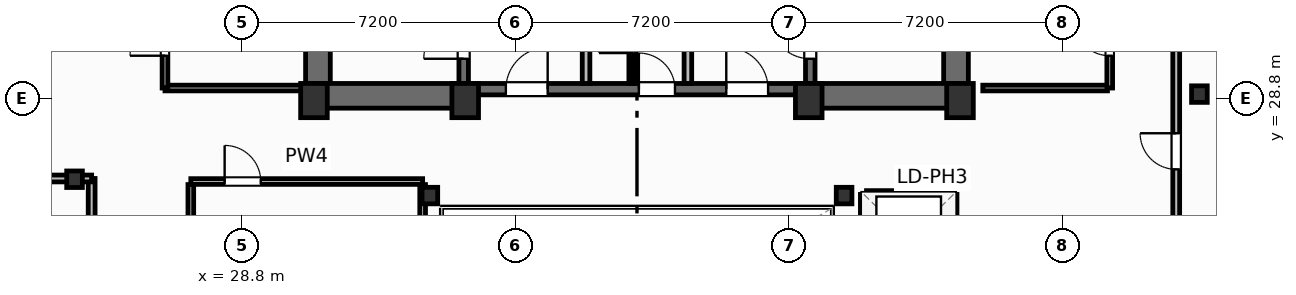
"""IFC4 building model, lengths in metres.
Left out: names, types, materials, properties, quantities, classifications, styles, units other than length and angle.
Written with IfcOpenShell. Run it as: python <this file> out.ifc"""

import sys

from ifc_helpers import new_model, si_unit, direction, frame, frame_2d, origin, origin_2d, place, context, subcontext, project, spatial, rectangle, i_section, extrude, element, fill, save


model = new_model("IFC4")
c1 = context("Model", 3, precision=1e-05, world=origin(), true_north=direction((0.0, 1.0)))
c2 = subcontext(c1, "Body", "Model", "MODEL_VIEW")
j1 = project(units=[si_unit("LENGTHUNIT", "METRE"), si_unit("PLANEANGLEUNIT", "RADIAN")], contexts=[c1])
p1 = place(None, origin())
s1 = spatial("IfcSite", under=j1, at=p1, CompositionType="ELEMENT")
p2 = place(p1, origin())
s2 = spatial("IfcBuilding", under=s1, at=p2, CompositionType="ELEMENT")
p3 = place(p2, frame((0.0, 0.0, 220.1)))
s3 = spatial("IfcBuildingStorey", under=s2, at=p3, CompositionType="ELEMENT", Elevation=220.1)
for number, where, z_axis, x_axis in (
    (1, (30.7, 28.75, 0.0), (0.0, 0.0, 1.0), (1.0, 0.0, 0.0)),
    (2, (34.68, 28.75, 0.0), (0.0, 0.0, 1.0), (1.0, 0.0, 0.0)),
    (3, (43.72, 28.75, 0.0), (0.0, 0.0, 1.0), (1.0, 0.0, 0.0)),
    (4, (47.7, 28.75, 0.0), (0.0, 0.0, 1.0), (1.0, 0.0, 0.0)),
):
    element("IfcColumn", number, at=place(p3, frame(where, z_axis=z_axis, x_axis=x_axis)), inside=s3, PredefinedType="COLUMN", context=c2, shape_type="SweptSolid", body=[
        extrude(rectangle(XDim=0.7, YDim=0.9, at=origin_2d()), origin(), (0.0, 0.0, 1.0), 3.7),
    ])
for number, where, z_axis, x_axis in (
    (5, (33.75, 26.25, 0.0), (0.0, 0.0, 1.0), (1.0, 0.0, 0.0)),
    (6, (44.65, 26.25, 0.0), (0.0, 0.0, 1.0), (1.0, 0.0, 0.0)),
    (7, (24.4, 26.68, 0.0), (0.0, 0.0, 1.0), (1.0, 0.0, 0.0)),
    (8, (54.0, 28.92, 0.0), (0.0, 0.0, 1.0), (1.0, 0.0, 0.0)),
):
    element("IfcColumn", number, at=place(p3, frame(where, z_axis=z_axis, x_axis=x_axis)), inside=s3, PredefinedType="COLUMN", context=c2, shape_type="SweptSolid", body=[
        extrude(i_section(OverallWidth=0.412, OverallDepth=0.435, WebThickness=0.036, FlangeThickness=0.057, FilletRadius=0.025, at=origin_2d()), origin(), (0.0, 0.0, 1.0), 3.7),
    ])
for number, where, z_axis, x_axis in (
    (9, (30.805, 29.2, 0.0), (0.0, 0.0, 1.0), (0.0, 1.0, 0.0)),
    (10, (47.595, 29.2, 0.0), (0.0, 0.0, 1.0), (0.0, 1.0, 0.0)),
):
    element("IfcWall", number, at=place(p3, frame(where, z_axis=z_axis, x_axis=x_axis)), inside=s3, PredefinedType="SHEAR", context=c2, shape_type="SweptSolid", body=[
        extrude(rectangle(XDim=9.22, YDim=0.65, at=frame_2d((4.61, 0.0))), origin(), (0.0, 0.0, 1.0), 3.45),
    ])
p4 = place(p3, frame((30.48, 28.875, 0.0), z_axis=(0.0, 0.0, 1.0), x_axis=(1.0, 0.0, 0.0)))
e11 = element("IfcWall", 11, at=p4, inside=s3, PredefinedType="SHEAR", context=c2, shape_type="SweptSolid", body=[
    extrude(rectangle(XDim=4.32, YDim=0.65, at=frame_2d((2.16, 0.0))), origin(), (0.0, 0.0, 1.0), 3.45),
])
p5 = place(p3, frame((43.6, 28.875, 0.0), z_axis=(0.0, 0.0, 1.0), x_axis=(1.0, 0.0, 0.0)))
e12 = element("IfcWall", 12, at=p5, inside=s3, PredefinedType="SHEAR", context=c2, shape_type="SweptSolid", body=[
    extrude(rectangle(XDim=4.32, YDim=0.65, at=frame_2d((2.16, 0.0))), origin(), (0.0, 0.0, 1.0), 3.45),
])
p6 = place(p3, frame((34.8, 29.05, 0.0), z_axis=(0.0, 0.0, 1.0), x_axis=(1.0, 0.0, 0.0)))
e13 = element("IfcWall", 13, at=p6, inside=s3, PredefinedType="SHEAR", context=c2, shape_type="SweptSolid", body=[
    extrude(rectangle(XDim=8.8, YDim=0.3, at=frame_2d((4.4, 0.0))), origin(), (0.0, 0.0, 1.0), 3.45),
])
p7 = place(p6, frame((0.95, 0.0, 0.0)))
e14 = element("IfcOpeningElement", 14, at=p7, cuts=e13, PredefinedType="OPENING", context=c2, shape_type="SweptSolid", body=[
    extrude(rectangle(XDim=1.1, YDim=2.15, at=frame_2d((0.55, 1.075))), frame((0.0, 0.16, 0.0), z_axis=(0.0, -1.0, 0.0), x_axis=(1.0, 0.0, 0.0)), (0.0, 0.0, 1.0), 0.32),
])
p8 = place(p6, frame((6.75, 0.0, 0.0)))
e15 = element("IfcOpeningElement", 15, at=p8, cuts=e13, PredefinedType="OPENING", context=c2, shape_type="SweptSolid", body=[
    extrude(rectangle(XDim=1.1, YDim=2.15, at=frame_2d((0.55, 1.075))), frame((0.0, 0.16, 0.0), z_axis=(0.0, -1.0, 0.0), x_axis=(1.0, 0.0, 0.0)), (0.0, 0.0, 1.0), 0.32),
])
p9 = place(p6, frame((4.45, 0.0, 0.0)))
e16 = element("IfcOpeningElement", 16, at=p9, cuts=e13, PredefinedType="OPENING", context=c2, shape_type="SweptSolid", body=[
    extrude(rectangle(XDim=0.95, YDim=2.15, at=frame_2d((0.475, 1.075))), frame((0.0, 0.16, 0.0), z_axis=(0.0, -1.0, 0.0), x_axis=(1.0, 0.0, 0.0)), (0.0, 0.0, 1.0), 0.32),
])
p10 = place(p3, frame((34.64, 29.2, 0.0), z_axis=(0.0, 0.0, 1.0), x_axis=(0.0, 1.0, 0.0)))
e17 = element("IfcWall", 17, at=p10, inside=s3, PredefinedType="SHEAR", context=c2, shape_type="SweptSolid", body=[
    extrude(rectangle(XDim=9.22, YDim=0.25, at=frame_2d((4.61, 0.0))), origin(), (0.0, 0.0, 1.0), 3.45),
])
p11 = place(p10, frame((0.65, 0.0, 0.0)))
e18 = element("IfcOpeningElement", 18, at=p11, cuts=e17, PredefinedType="OPENING", context=c2, shape_type="SweptSolid", body=[
    extrude(rectangle(XDim=1.05, YDim=2.15, at=frame_2d((0.525, 1.075))), frame((0.0, 0.135, 0.0), z_axis=(0.0, -1.0, 0.0), x_axis=(1.0, 0.0, 0.0)), (0.0, 0.0, 1.0), 0.27),
])
p12 = place(p3, frame((43.76, 29.2, 0.0), z_axis=(0.0, 0.0, 1.0), x_axis=(0.0, 1.0, 0.0)))
e19 = element("IfcWall", 19, at=p12, inside=s3, PredefinedType="SHEAR", context=c2, shape_type="SweptSolid", body=[
    extrude(rectangle(XDim=9.22, YDim=0.25, at=frame_2d((4.61, 0.0))), origin(), (0.0, 0.0, 1.0), 3.45),
])
p13 = place(p12, frame((0.65, 0.0, 0.0)))
e20 = element("IfcOpeningElement", 20, at=p13, cuts=e19, PredefinedType="OPENING", context=c2, shape_type="SweptSolid", body=[
    extrude(rectangle(XDim=1.05, YDim=2.15, at=frame_2d((0.525, 1.075))), frame((0.0, 0.135, 0.0), z_axis=(0.0, -1.0, 0.0), x_axis=(1.0, 0.0, 0.0)), (0.0, 0.0, 1.0), 0.27),
])
p14 = place(p3, frame((24.85, 19.2, 0.0), z_axis=(0.0, 0.0, 1.0), x_axis=(0.0, 1.0, 0.0)))
e21 = element("IfcWall", 21, at=p14, inside=s3, PredefinedType="PARTITIONING", context=c2, shape_type="SweptSolid", body=[
    extrude(rectangle(XDim=7.5, YDim=0.18, at=frame_2d((3.75, 0.0))), origin(), (0.0, 0.0, 1.0), 3.45),
])
p15 = place(p14, frame((3.275, 0.0, 0.0)))
e22 = element("IfcOpeningElement", 22, at=p15, cuts=e21, PredefinedType="OPENING", context=c2, shape_type="SweptSolid", body=[
    extrude(rectangle(XDim=0.95, YDim=2.05, at=frame_2d((0.475, 1.025))), frame((0.0, 0.1, 0.0), z_axis=(0.0, -1.0, 0.0), x_axis=(1.0, 0.0, 0.0)), (0.0, 0.0, 1.0), 0.2),
])
p16 = place(p3, frame((3.467, 26.7, 0.0), z_axis=(0.0, 0.0, 1.0), x_axis=(1.0, 0.0, 0.0)))
e23 = element("IfcWall", 23, at=p16, inside=s3, PredefinedType="PARTITIONING", context=c2, shape_type="SweptSolid", body=[
    extrude(rectangle(XDim=21.383, YDim=0.18, at=frame_2d((10.691, 0.0))), origin(), (0.0, 0.0, 1.0), 2.662),
])
p17 = place(p3, frame((53.39, 19.24, 0.0), z_axis=(0.0, 0.0, 1.0), x_axis=(0.0, 1.0, 0.0)))
e24 = element("IfcWall", 24, at=p17, inside=s3, PredefinedType="PARTITIONING", context=c2, shape_type="SweptSolid", body=[
    extrude(rectangle(XDim=20.06, YDim=0.18, at=frame_2d((10.03, 0.0))), origin(), (0.0, 0.0, 1.0), 3.45),
])
p18 = place(p17, frame((7.7, 0.0, 0.0)))
e25 = element("IfcOpeningElement", 25, at=p18, cuts=e24, PredefinedType="OPENING", context=c2, shape_type="SweptSolid", body=[
    extrude(rectangle(XDim=0.95, YDim=2.05, at=frame_2d((0.475, 1.025))), frame((0.0, 0.1, 0.0), z_axis=(0.0, -1.0, 0.0), x_axis=(1.0, 0.0, 0.0)), (0.0, 0.0, 1.0), 0.2),
])
for number, where, z_axis, x_axis in (
    (26, (37.86, 29.2, 0.0), (0.0, 0.0, 1.0), (0.0, 1.0, 0.0)),
    (27, (40.54, 29.2, 0.0), (0.0, 0.0, 1.0), (0.0, 1.0, 0.0)),
):
    element("IfcWall", number, at=place(p3, frame(where, z_axis=z_axis, x_axis=x_axis)), inside=s3, PredefinedType="PARTITIONING", context=c2, shape_type="SweptSolid", body=[
        extrude(rectangle(XDim=5.18, YDim=0.2, at=frame_2d((2.59, 0.0))), origin(), (0.0, 0.0, 1.0), 3.45),
    ])
p19 = place(p3, frame((39.05, 29.2, 0.0), z_axis=(0.0, 0.0, 1.0), x_axis=(0.0, 1.0, 0.0)))
e28 = element("IfcWall", 28, at=p19, inside=s3, PredefinedType="PARTITIONING", context=c2, shape_type="SweptSolid", body=[
    extrude(rectangle(XDim=5.22, YDim=0.125, at=frame_2d((2.61, 0.0))), origin(), (0.0, 0.0, 1.0), 3.45),
])
p20 = place(p19, frame((0.8, 0.0, 0.0)))
e29 = element("IfcOpeningElement", 29, at=p20, cuts=e28, PredefinedType="OPENING", context=c2, shape_type="SweptSolid", body=[
    extrude(rectangle(XDim=0.85, YDim=2.05, at=frame_2d((0.425, 1.025))), frame((0.0, 0.073, 0.0), z_axis=(0.0, -1.0, 0.0), x_axis=(1.0, 0.0, 0.0)), (0.0, 0.0, 1.0), 0.145),
])
p21 = place(p19, frame((3.4, 0.0, 0.0)))
e30 = element("IfcOpeningElement", 30, at=p21, cuts=e28, PredefinedType="OPENING", context=c2, shape_type="SweptSolid", body=[
    extrude(rectangle(XDim=0.85, YDim=2.05, at=frame_2d((0.425, 1.025))), frame((0.0, 0.073, 0.0), z_axis=(0.0, -1.0, 0.0), x_axis=(1.0, 0.0, 0.0)), (0.0, 0.0, 1.0), 0.145),
])
p22 = place(p3, frame((27.46, 26.62, 0.0), z_axis=(0.0, 0.0, 1.0), x_axis=(1.0, 0.0, 0.0)))
e31 = element("IfcWall", 31, at=p22, inside=s3, PredefinedType="PARTITIONING", context=c2, shape_type="SweptSolid", body=[
    extrude(rectangle(XDim=6.1, YDim=0.15, at=frame_2d((3.05, 0.0))), origin(), (0.0, 0.0, 1.0), 2.662),
])
p23 = place(p22, frame((0.89, 0.0, 0.0)))
e32 = element("IfcOpeningElement", 32, at=p23, cuts=e31, PredefinedType="OPENING", context=c2, shape_type="SweptSolid", body=[
    extrude(rectangle(XDim=0.95, YDim=2.05, at=frame_2d((0.475, 1.025))), frame((0.0, 0.085, 0.0), z_axis=(0.0, -1.0, 0.0), x_axis=(1.0, 0.0, 0.0)), (0.0, 0.0, 1.0), 0.17),
])
p24 = place(p3, frame((27.46, 19.38, 0.0), z_axis=(0.0, 0.0, 1.0), x_axis=(0.0, 1.0, 0.0)))
e33 = element("IfcWall", 33, at=p24, inside=s3, PredefinedType="PARTITIONING", context=c2, shape_type="SweptSolid", body=[
    extrude(rectangle(XDim=7.16, YDim=0.15, at=frame_2d((3.58, 0.0))), origin(), (0.0, 0.0, 1.0), 3.45),
])
p25 = place(p24, frame((1.1, 0.0, 0.0)))
e34 = element("IfcOpeningElement", 34, at=p25, cuts=e33, PredefinedType="OPENING", context=c2, shape_type="SweptSolid", body=[
    extrude(rectangle(XDim=0.9, YDim=2.05, at=frame_2d((0.45, 1.025))), frame((0.0, 0.085, 0.0), z_axis=(0.0, -1.0, 0.0), x_axis=(1.0, 0.0, 0.0)), (0.0, 0.0, 1.0), 0.17),
])
p26 = place(p3, frame((33.56, 19.38, 0.0), z_axis=(0.0, 0.0, 1.0), x_axis=(0.0, 1.0, 0.0)))
e35 = element("IfcWall", 35, at=p26, inside=s3, PredefinedType="PARTITIONING", context=c2, shape_type="SweptSolid", body=[
    extrude(rectangle(XDim=7.16, YDim=0.15, at=frame_2d((3.58, 0.0))), origin(), (0.0, 0.0, 1.0), 2.824),
])
p27 = place(p3, frame((26.78, 29.08, 0.0), z_axis=(0.0, 0.0, 1.0), x_axis=(1.0, 0.0, 0.0)))
e36 = element("IfcWall", 36, at=p27, inside=s3, PredefinedType="PARTITIONING", context=c2, shape_type="SweptSolid", body=[
    extrude(rectangle(XDim=3.7, YDim=0.15, at=frame_2d((1.85, 0.0))), origin(), (0.0, 0.0, 1.0), 3.45),
])
p28 = place(p3, frame((26.78, 29.08, 0.0), z_axis=(0.0, 0.0, 1.0), x_axis=(0.0, 1.0, 0.0)))
e37 = element("IfcWall", 37, at=p28, inside=s3, PredefinedType="PARTITIONING", context=c2, shape_type="SweptSolid", body=[
    extrude(rectangle(XDim=5.87, YDim=0.15, at=frame_2d((2.935, 0.0))), origin(), (0.0, 0.0, 1.0), 3.45),
])
p29 = place(p28, frame((0.85, 0.0, 0.0)))
e38 = element("IfcOpeningElement", 38, at=p29, cuts=e37, PredefinedType="OPENING", context=c2, shape_type="SweptSolid", body=[
    extrude(rectangle(XDim=0.92, YDim=2.05, at=frame_2d((0.46, 1.025))), frame((0.0, 0.085, 0.0), z_axis=(0.0, -1.0, 0.0), x_axis=(1.0, 0.0, 0.0)), (0.0, 0.0, 1.0), 0.17),
])
p30 = place(p28, frame((3.45, 0.0, 0.0)))
e39 = element("IfcOpeningElement", 39, at=p30, cuts=e37, PredefinedType="OPENING", context=c2, shape_type="SweptSolid", body=[
    extrude(rectangle(XDim=0.85, YDim=2.05, at=frame_2d((0.425, 1.025))), frame((0.0, 0.085, 0.0), z_axis=(0.0, -1.0, 0.0), x_axis=(1.0, 0.0, 0.0)), (0.0, 0.0, 1.0), 0.17),
])
p31 = place(p3, frame((48.3, 29.08, 0.0), z_axis=(0.0, 0.0, 1.0), x_axis=(1.0, 0.0, 0.0)))
e40 = element("IfcWall", 40, at=p31, inside=s3, PredefinedType="PARTITIONING", context=c2, shape_type="SweptSolid", body=[
    extrude(rectangle(XDim=3.28, YDim=0.15, at=frame_2d((1.64, 0.0))), origin(), (0.0, 0.0, 1.0), 2.662),
])
p32 = place(p3, frame((51.64, 29.08, 0.0), z_axis=(0.0, 0.0, 1.0), x_axis=(0.0, 1.0, 0.0)))
e41 = element("IfcWall", 41, at=p32, inside=s3, PredefinedType="PARTITIONING", context=c2, shape_type="SweptSolid", body=[
    extrude(rectangle(XDim=6.88, YDim=0.15, at=frame_2d((3.44, 0.0))), origin(), (0.0, 0.0, 1.0), 3.45),
])
p33 = place(p32, frame((0.85, 0.0, 0.0)))
e42 = element("IfcOpeningElement", 42, at=p33, cuts=e41, PredefinedType="OPENING", context=c2, shape_type="SweptSolid", body=[
    extrude(rectangle(XDim=0.95, YDim=2.05, at=frame_2d((0.475, 1.025))), frame((0.0, 0.085, 0.0), z_axis=(0.0, -1.0, 0.0), x_axis=(1.0, 0.0, 0.0)), (0.0, 0.0, 1.0), 0.17),
])
p34 = place(p3, frame((45.24, 26.28, 0.0), z_axis=(0.0, 0.0, 1.0), x_axis=(1.0, 0.0, 0.0)))
e43 = element("IfcWall", 43, at=p34, inside=s3, PredefinedType="PARTITIONING", context=c2, shape_type="SweptSolid", body=[
    extrude(rectangle(XDim=2.22, YDim=0.2, at=frame_2d((1.11, 0.0))), origin(), (0.0, 0.0, 1.0), 3.45),
])
p35 = place(p3, frame((45.18, 19.38, 0.0), z_axis=(0.0, 0.0, 1.0), x_axis=(0.0, 1.0, 0.0)))
e44 = element("IfcWall", 44, at=p35, inside=s3, PredefinedType="PARTITIONING", context=c2, shape_type="SweptSolid", body=[
    extrude(rectangle(XDim=6.9, YDim=0.2, at=frame_2d((3.45, 0.0))), origin(), (0.0, 0.0, 1.0), 3.45),
])
p36 = place(p3, frame((47.52, 19.38, 0.0), z_axis=(0.0, 0.0, 1.0), x_axis=(0.0, 1.0, 0.0)))
e45 = element("IfcWall", 45, at=p36, inside=s3, PredefinedType="PARTITIONING", context=c2, shape_type="SweptSolid", body=[
    extrude(rectangle(XDim=6.9, YDim=0.2, at=frame_2d((3.45, 0.0))), origin(), (0.0, 0.0, 1.0), 3.45),
])
p37 = place(p36, frame((0.59, 0.0, 0.0)))
e46 = element("IfcOpeningElement", 46, at=p37, cuts=e45, PredefinedType="OPENING", context=c2, shape_type="SweptSolid", body=[
    extrude(rectangle(XDim=1.1, YDim=2.15, at=frame_2d((0.55, 1.075))), frame((0.0, 0.11, 0.0), z_axis=(0.0, -1.0, 0.0), x_axis=(1.0, 0.0, 0.0)), (0.0, 0.0, 1.0), 0.22),
])
p38 = place(p36, frame((2.89, 0.0, 0.0)))
e47 = element("IfcOpeningElement", 47, at=p38, cuts=e45, PredefinedType="OPENING", context=c2, shape_type="SweptSolid", body=[
    extrude(rectangle(XDim=1.1, YDim=2.15, at=frame_2d((0.55, 1.075))), frame((0.0, 0.11, 0.0), z_axis=(0.0, -1.0, 0.0), x_axis=(1.0, 0.0, 0.0)), (0.0, 0.0, 1.0), 0.22),
])
p39 = place(p36, frame((5.19, 0.0, 0.0)))
e48 = element("IfcOpeningElement", 48, at=p39, cuts=e45, PredefinedType="OPENING", context=c2, shape_type="SweptSolid", body=[
    extrude(rectangle(XDim=1.1, YDim=2.15, at=frame_2d((0.55, 1.075))), frame((0.0, 0.11, 0.0), z_axis=(0.0, -1.0, 0.0), x_axis=(1.0, 0.0, 0.0)), (0.0, 0.0, 1.0), 0.22),
])
p40 = place(p18, origin())
e49 = element("IfcDoor", 49, at=p40, inside=s3, OperationType="SINGLE_SWING_RIGHT", PredefinedType="DOOR", context=c2, shape_type="SweptSolid", body=[
    extrude(rectangle(XDim=0.95, YDim=2.05, at=frame_2d((0.475, 1.025))), frame((0.0, 0.025, 0.0), z_axis=(0.0, -1.0, 0.0), x_axis=(1.0, 0.0, 0.0)), (0.0, 0.0, 1.0), 0.05),
])
fill(e25, e49)
p41 = place(p11, origin())
e50 = element("IfcDoor", 50, at=p41, inside=s3, OperationType="SINGLE_SWING_LEFT", PredefinedType="DOOR", context=c2, shape_type="SweptSolid", body=[
    extrude(rectangle(XDim=1.05, YDim=2.15, at=frame_2d((0.525, 1.075))), frame((0.0, 0.025, 0.0), z_axis=(0.0, -1.0, 0.0), x_axis=(1.0, 0.0, 0.0)), (0.0, 0.0, 1.0), 0.05),
])
fill(e18, e50)
p42 = place(p13, origin())
e51 = element("IfcDoor", 51, at=p42, inside=s3, OperationType="SINGLE_SWING_RIGHT", PredefinedType="DOOR", context=c2, shape_type="SweptSolid", body=[
    extrude(rectangle(XDim=1.05, YDim=2.15, at=frame_2d((0.525, 1.075))), frame((0.0, 0.025, 0.0), z_axis=(0.0, -1.0, 0.0), x_axis=(1.0, 0.0, 0.0)), (0.0, 0.0, 1.0), 0.05),
])
fill(e20, e51)
p43 = place(p7, origin())
e52 = element("IfcDoor", 52, at=p43, inside=s3, OperationType="SINGLE_SWING_RIGHT", PredefinedType="DOOR", context=c2, shape_type="SweptSolid", body=[
    extrude(rectangle(XDim=1.1, YDim=2.15, at=frame_2d((0.55, 1.075))), frame((0.0, 0.025, 0.0), z_axis=(0.0, -1.0, 0.0), x_axis=(1.0, 0.0, 0.0)), (0.0, 0.0, 1.0), 0.05),
])
fill(e14, e52)
p44 = place(p8, origin())
e53 = element("IfcDoor", 53, at=p44, inside=s3, OperationType="SINGLE_SWING_LEFT", PredefinedType="DOOR", context=c2, shape_type="SweptSolid", body=[
    extrude(rectangle(XDim=1.1, YDim=2.15, at=frame_2d((0.55, 1.075))), frame((0.0, 0.025, 0.0), z_axis=(0.0, -1.0, 0.0), x_axis=(1.0, 0.0, 0.0)), (0.0, 0.0, 1.0), 0.05),
])
fill(e15, e53)
p45 = place(p20, origin())
e54 = element("IfcDoor", 54, at=p45, inside=s3, OperationType="SINGLE_SWING_LEFT", PredefinedType="DOOR", context=c2, shape_type="SweptSolid", body=[
    extrude(rectangle(XDim=0.85, YDim=2.05, at=frame_2d((0.425, 1.025))), frame((0.0, 0.025, 0.0), z_axis=(0.0, -1.0, 0.0), x_axis=(1.0, 0.0, 0.0)), (0.0, 0.0, 1.0), 0.05),
])
fill(e29, e54)
p46 = place(p9, origin())
e55 = element("IfcDoor", 55, at=p46, inside=s3, OperationType="SINGLE_SWING_LEFT", PredefinedType="DOOR", context=c2, shape_type="SweptSolid", body=[
    extrude(rectangle(XDim=0.95, YDim=2.15, at=frame_2d((0.475, 1.075))), frame((0.0, 0.025, 0.0), z_axis=(0.0, -1.0, 0.0), x_axis=(1.0, 0.0, 0.0)), (0.0, 0.0, 1.0), 0.05),
])
fill(e16, e55)
p47 = place(p23, origin())
e56 = element("IfcDoor", 56, at=p47, inside=s3, OperationType="SINGLE_SWING_LEFT", PredefinedType="DOOR", context=c2, shape_type="SweptSolid", body=[
    extrude(rectangle(XDim=0.95, YDim=2.05, at=frame_2d((0.475, 1.025))), frame((0.0, 0.025, 0.0), z_axis=(0.0, -1.0, 0.0), x_axis=(1.0, 0.0, 0.0)), (0.0, 0.0, 1.0), 0.05),
])
fill(e32, e56)
p48 = place(p29, origin())
e57 = element("IfcDoor", 57, at=p48, inside=s3, OperationType="SINGLE_SWING_LEFT", PredefinedType="DOOR", context=c2, shape_type="SweptSolid", body=[
    extrude(rectangle(XDim=0.92, YDim=2.05, at=frame_2d((0.46, 1.025))), frame((0.0, 0.025, 0.0), z_axis=(0.0, -1.0, 0.0), x_axis=(1.0, 0.0, 0.0)), (0.0, 0.0, 1.0), 0.05),
])
fill(e38, e57)
p49 = place(p33, origin())
e58 = element("IfcDoor", 58, at=p49, inside=s3, OperationType="SINGLE_SWING_RIGHT", PredefinedType="DOOR", context=c2, shape_type="SweptSolid", body=[
    extrude(rectangle(XDim=0.95, YDim=2.05, at=frame_2d((0.475, 1.025))), frame((0.0, 0.025, 0.0), z_axis=(0.0, -1.0, 0.0), x_axis=(1.0, 0.0, 0.0)), (0.0, 0.0, 1.0), 0.05),
])
fill(e42, e58)
save(model, sys.argv[1])
